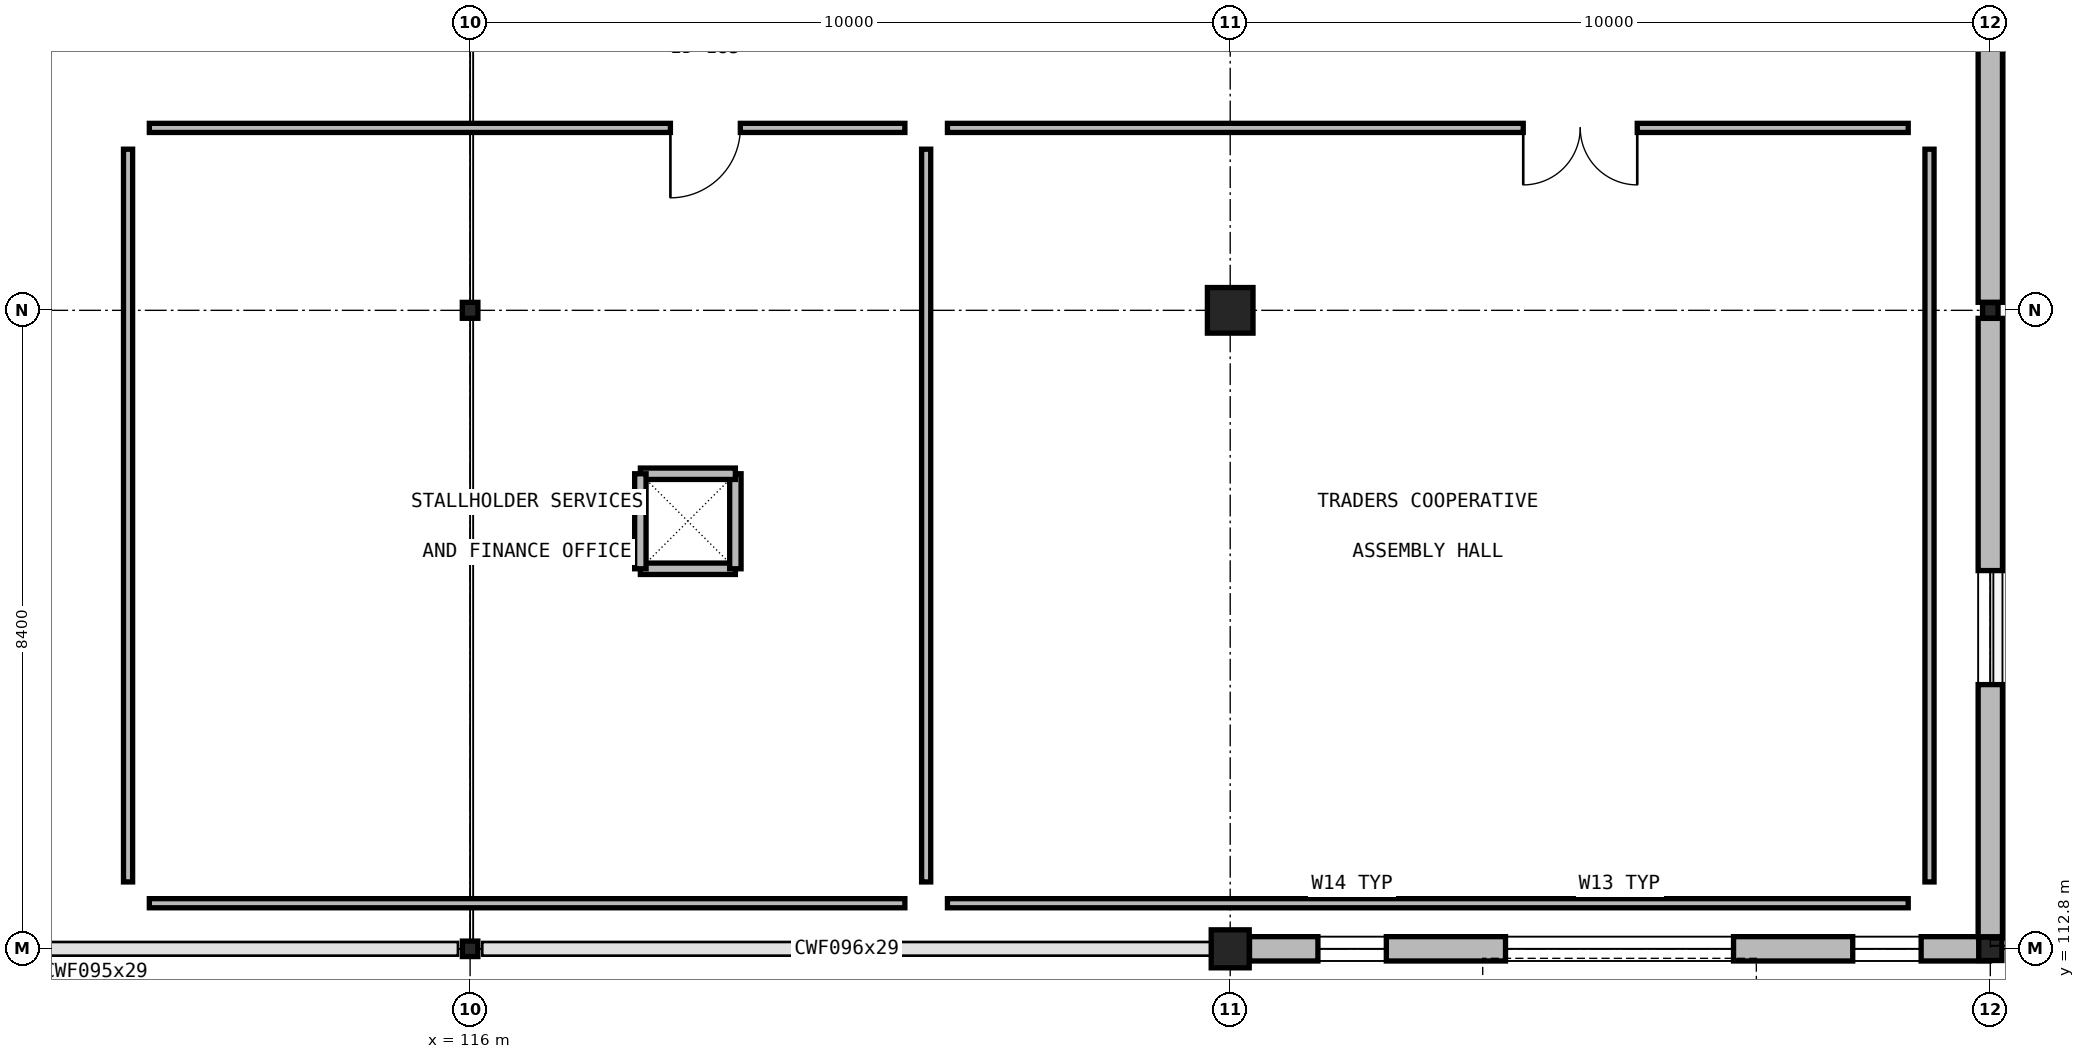
"""IFC4 building model, lengths in metres.
Left out: names, types, materials, properties, quantities, classifications, styles, units other than length and angle.
Written with IfcOpenShell. Run it as: python <this file> out.ifc"""

import sys

from ifc_helpers import new_model, si_unit, direction, frame, frame_2d, origin, origin_2d_with_axis, place, context, subcontext, project, spatial, rectangle, i_section, extrude, element, fill, save


model = new_model("IFC4")
c1 = context("Model", 3, precision=1e-05, world=origin(), true_north=direction((0.0, 1.0)))
c2 = subcontext(c1, "Body", "Model", "MODEL_VIEW")
j1 = project(units=[si_unit("LENGTHUNIT", "METRE"), si_unit("PLANEANGLEUNIT", "RADIAN")], contexts=[c1])
p1 = place(None, origin())
s1 = spatial("IfcSite", under=j1, at=p1, CompositionType="ELEMENT")
p2 = place(p1, origin())
s2 = spatial("IfcBuilding", under=s1, at=p2, CompositionType="ELEMENT")
p3 = place(p2, frame((0.0, 0.0, 15.3)))
s3 = spatial("IfcBuildingStorey", under=s2, at=p3, CompositionType="ELEMENT", Elevation=15.3)
p4 = place(p3, frame((116.0, 112.8, 0.0), z_axis=(0.0, 0.0, 1.0), x_axis=(1.0, 0.0, 0.0)))
e1 = element("IfcColumn", 1, at=p4, inside=s3, PredefinedType="COLUMN", context=c2, shape_type="SweptSolid", body=[
    extrude(i_section(OverallWidth=0.203, OverallDepth=0.203, WebThickness=0.007, FlangeThickness=0.011, FilletRadius=0.011, at=origin_2d_with_axis()), origin(), (0.0, 0.0, 1.0), 3.3),
])
p5 = place(p3, frame((116.0, 121.2, 0.0), z_axis=(0.0, 0.0, 1.0), x_axis=(1.0, 0.0, 0.0)))
e2 = element("IfcColumn", 2, at=p5, inside=s3, PredefinedType="COLUMN", context=c2, shape_type="SweptSolid", body=[
    extrude(i_section(OverallWidth=0.205, OverallDepth=0.21, WebThickness=0.009, FlangeThickness=0.014, FilletRadius=0.011, at=origin_2d_with_axis()), origin(), (0.0, 0.0, 1.0), 3.3),
])
p6 = place(p3, frame((126.0, 112.8, 0.0), z_axis=(0.0, 0.0, 1.0), x_axis=(1.0, 0.0, 0.0)))
e3 = element("IfcColumn", 3, at=p6, inside=s3, PredefinedType="COLUMN", context=c2, shape_type="SweptSolid", body=[
    extrude(rectangle(XDim=0.5, YDim=0.5, at=origin_2d_with_axis()), origin(), (0.0, 0.0, 1.0), 3.3),
])
p7 = place(p3, frame((126.0, 121.2, 0.0), z_axis=(0.0, 0.0, 1.0), x_axis=(1.0, 0.0, 0.0)))
e4 = element("IfcColumn", 4, at=p7, inside=s3, PredefinedType="COLUMN", context=c2, shape_type="SweptSolid", body=[
    extrude(rectangle(XDim=0.6, YDim=0.6, at=origin_2d_with_axis()), origin(), (0.0, 0.0, 1.0), 3.3),
])
p8 = place(p3, frame((136.0, 112.8, 0.0), z_axis=(0.0, 0.0, 1.0), x_axis=(1.0, 0.0, 0.0)))
e5 = element("IfcColumn", 5, at=p8, inside=s3, PredefinedType="COLUMN", context=c2, shape_type="SweptSolid", body=[
    extrude(i_section(OverallWidth=0.305, OverallDepth=0.308, WebThickness=0.01, FlangeThickness=0.015, FilletRadius=0.017, at=origin_2d_with_axis()), origin(), (0.0, 0.0, 1.0), 3.3),
])
p9 = place(p3, frame((136.0, 121.2, 0.0), z_axis=(0.0, 0.0, 1.0), x_axis=(1.0, 0.0, 0.0)))
e6 = element("IfcColumn", 6, at=p9, inside=s3, PredefinedType="COLUMN", context=c2, shape_type="SweptSolid", body=[
    extrude(i_section(OverallWidth=0.203, OverallDepth=0.203, WebThickness=0.007, FlangeThickness=0.011, FilletRadius=0.011, at=origin_2d_with_axis()), origin(), (0.0, 0.0, 1.0), 3.3),
])
p10 = place(p3, frame((126.254, 112.8, 0.0), z_axis=(0.0, 0.0, 1.0), x_axis=(1.0, 0.0, 0.0)))
e7 = element("IfcWall", 7, at=p10, inside=s3, PredefinedType="SOLIDWALL", context=c2, shape_type="SweptSolid", body=[
    extrude(rectangle(XDim=9.736, YDim=0.32, at=frame_2d((4.868, 0.0), x_axis=(1.0, 0.0))), origin(), (0.0, 0.0, 1.0), 2.94),
])
p11 = place(p10, frame((3.368, 0.0, 0.85)))
e8 = element("IfcOpeningElement", 8, at=p11, cuts=e7, PredefinedType="OPENING", context=c2, shape_type="SweptSolid", body=[
    extrude(rectangle(XDim=3.0, YDim=1.65, at=frame_2d((1.5, 0.825), x_axis=(1.0, 0.0))), frame((0.0, 0.17, 0.0), z_axis=(0.0, -1.0, 0.0), x_axis=(1.0, 0.0, 0.0)), (0.0, 0.0, 1.0), 0.34),
])
p12 = place(p10, frame((0.9, 0.0, 0.85)))
e9 = element("IfcOpeningElement", 9, at=p12, cuts=e7, PredefinedType="OPENING", context=c2, shape_type="SweptSolid", body=[
    extrude(rectangle(XDim=0.9, YDim=1.65, at=frame_2d((0.45, 0.825), x_axis=(1.0, 0.0))), frame((0.0, 0.17, 0.0), z_axis=(0.0, -1.0, 0.0), x_axis=(1.0, 0.0, 0.0)), (0.0, 0.0, 1.0), 0.34),
])
p13 = place(p10, frame((7.936, 0.0, 0.85)))
e10 = element("IfcOpeningElement", 10, at=p13, cuts=e7, PredefinedType="OPENING", context=c2, shape_type="SweptSolid", body=[
    extrude(rectangle(XDim=0.9, YDim=1.65, at=frame_2d((0.45, 0.825), x_axis=(1.0, 0.0))), frame((0.0, 0.17, 0.0), z_axis=(0.0, -1.0, 0.0), x_axis=(1.0, 0.0, 0.0)), (0.0, 0.0, 1.0), 0.34),
])
p14 = place(p3, frame((136.0, 112.958, 0.0), z_axis=(0.0, 0.0, 1.0), x_axis=(0.0, 1.0, 0.0)))
e11 = element("IfcWall", 11, at=p14, inside=s3, PredefinedType="SOLIDWALL", context=c2, shape_type="SweptSolid", body=[
    extrude(rectangle(XDim=8.136, YDim=0.32, at=frame_2d((4.068, 0.0), x_axis=(1.0, 0.0))), origin(), (0.0, 0.0, 1.0), 2.94),
])
p15 = place(p14, frame((3.318, 0.0, 0.85)))
e12 = element("IfcOpeningElement", 12, at=p15, cuts=e11, PredefinedType="OPENING", context=c2, shape_type="SweptSolid", body=[
    extrude(rectangle(XDim=1.5, YDim=1.6, at=frame_2d((0.75, 0.8), x_axis=(1.0, 0.0))), frame((0.0, 0.17, 0.0), z_axis=(0.0, -1.0, 0.0), x_axis=(1.0, 0.0, 0.0)), (0.0, 0.0, 1.0), 0.34),
])
p16 = place(p3, frame((136.0, 121.306, 0.0), z_axis=(0.0, 0.0, 1.0), x_axis=(0.0, 1.0, 0.0)))
e13 = element("IfcWall", 13, at=p16, inside=s3, PredefinedType="SOLIDWALL", context=c2, shape_type="SweptSolid", body=[
    extrude(rectangle(XDim=8.186, YDim=0.32, at=frame_2d((4.093, 0.0), x_axis=(1.0, 0.0))), origin(), (0.0, 0.0, 1.0), 2.94),
])
p17 = place(p16, frame((3.493, 0.0, 0.0)))
e14 = element("IfcOpeningElement", 14, at=p17, cuts=e13, PredefinedType="OPENING", context=c2, shape_type="SweptSolid", body=[
    extrude(rectangle(XDim=1.2, YDim=2.2, at=frame_2d((0.6, 1.1), x_axis=(1.0, 0.0))), frame((0.0, 0.17, 0.0), z_axis=(0.0, -1.0, 0.0), x_axis=(1.0, 0.0, 0.0)), (0.0, 0.0, 1.0), 0.34),
])
for number, where, z_axis, x_axis in (
    (15, (118.24, 117.8, 0.0), (0.0, 0.0, 1.0), (1.0, 0.0, 0.0)),
    (16, (119.49, 117.8, 0.0), (0.0, 0.0, 1.0), (0.0, 1.0, 0.0)),
    (17, (119.49, 119.05, 0.0), (0.0, 0.0, 1.0), (-1.0, 0.0, 0.0)),
    (18, (118.24, 119.05, 0.0), (0.0, 0.0, 1.0), (0.0, -1.0, 0.0)),
):
    element("IfcWall", number, at=place(p3, frame(where, z_axis=z_axis, x_axis=x_axis)), inside=s3, PredefinedType="PARTITIONING", context=c2, shape_type="SweptSolid", body=[
        extrude(rectangle(XDim=1.25, YDim=0.15, at=frame_2d((0.625, 0.0), x_axis=(1.0, 0.0))), origin(), (0.0, 0.0, 1.0), 2.61),
    ])
p18 = place(p3, frame((111.78, 113.4, 0.0), z_axis=(0.0, 0.0, 1.0), x_axis=(1.0, 0.0, 0.0)))
e19 = element("IfcWall", 19, at=p18, inside=s3, PredefinedType="PARTITIONING", context=c2, shape_type="SweptSolid", body=[
    extrude(rectangle(XDim=9.94, YDim=0.12, at=frame_2d((4.97, 0.0), x_axis=(1.0, 0.0))), origin(), (0.0, 0.0, 1.0), 2.47),
])
p19 = place(p3, frame((122.0, 113.68, 0.0), z_axis=(0.0, 0.0, 1.0), x_axis=(0.0, 1.0, 0.0)))
e20 = element("IfcWall", 20, at=p19, inside=s3, PredefinedType="PARTITIONING", context=c2, shape_type="SweptSolid", body=[
    extrude(rectangle(XDim=9.64, YDim=0.12, at=frame_2d((4.82, 0.0), x_axis=(1.0, 0.0))), origin(), (0.0, 0.0, 1.0), 2.47),
])
p20 = place(p3, frame((121.72, 123.6, 0.0), z_axis=(0.0, 0.0, 1.0), x_axis=(-1.0, 0.0, 0.0)))
e21 = element("IfcWall", 21, at=p20, inside=s3, PredefinedType="PARTITIONING", context=c2, shape_type="SweptSolid", body=[
    extrude(rectangle(XDim=9.94, YDim=0.12, at=frame_2d((4.97, 0.0), x_axis=(1.0, 0.0))), origin(), (0.0, 0.0, 1.0), 2.47),
])
p21 = place(p20, frame((2.165, 0.0, 0.0)))
e22 = element("IfcOpeningElement", 22, at=p21, cuts=e21, PredefinedType="OPENING", context=c2, shape_type="SweptSolid", body=[
    extrude(rectangle(XDim=0.92, YDim=2.15, at=frame_2d((0.46, 1.075), x_axis=(1.0, 0.0))), frame((0.0, 0.07, 0.0), z_axis=(0.0, -1.0, 0.0), x_axis=(1.0, 0.0, 0.0)), (0.0, 0.0, 1.0), 0.14),
])
p22 = place(p3, frame((111.5, 123.32, 0.0), z_axis=(0.0, 0.0, 1.0), x_axis=(0.0, -1.0, 0.0)))
e23 = element("IfcWall", 23, at=p22, inside=s3, PredefinedType="PARTITIONING", context=c2, shape_type="SweptSolid", body=[
    extrude(rectangle(XDim=9.64, YDim=0.12, at=frame_2d((4.82, 0.0), x_axis=(1.0, 0.0))), origin(), (0.0, 0.0, 1.0), 2.47),
])
p23 = place(p3, frame((122.28, 113.4, 0.0), z_axis=(0.0, 0.0, 1.0), x_axis=(1.0, 0.0, 0.0)))
e24 = element("IfcWall", 24, at=p23, inside=s3, PredefinedType="PARTITIONING", context=c2, shape_type="SweptSolid", body=[
    extrude(rectangle(XDim=12.64, YDim=0.12, at=frame_2d((6.32, 0.0), x_axis=(1.0, 0.0))), origin(), (0.0, 0.0, 1.0), 2.47),
])
p24 = place(p3, frame((135.2, 113.68, 0.0), z_axis=(0.0, 0.0, 1.0), x_axis=(0.0, 1.0, 0.0)))
e25 = element("IfcWall", 25, at=p24, inside=s3, PredefinedType="PARTITIONING", context=c2, shape_type="SweptSolid", body=[
    extrude(rectangle(XDim=9.64, YDim=0.12, at=frame_2d((4.82, 0.0), x_axis=(1.0, 0.0))), origin(), (0.0, 0.0, 1.0), 2.47),
])
p25 = place(p3, frame((134.92, 123.6, 0.0), z_axis=(0.0, 0.0, 1.0), x_axis=(-1.0, 0.0, 0.0)))
e26 = element("IfcWall", 26, at=p25, inside=s3, PredefinedType="PARTITIONING", context=c2, shape_type="SweptSolid", body=[
    extrude(rectangle(XDim=12.64, YDim=0.12, at=frame_2d((6.32, 0.0), x_axis=(1.0, 0.0))), origin(), (0.0, 0.0, 1.0), 2.47),
])
p26 = place(p25, frame((3.565, 0.0, 0.0)))
e27 = element("IfcOpeningElement", 27, at=p26, cuts=e26, PredefinedType="OPENING", context=c2, shape_type="SweptSolid", body=[
    extrude(rectangle(XDim=1.5, YDim=2.25, at=frame_2d((0.75, 1.125), x_axis=(1.0, 0.0))), frame((0.0, 0.07, 0.0), z_axis=(0.0, -1.0, 0.0), x_axis=(1.0, 0.0, 0.0)), (0.0, 0.0, 1.0), 0.14),
])
p27 = place(p11, origin())
e28 = element("IfcWindow", 28, at=p27, inside=s3, PartitioningType="SINGLE_PANEL", PredefinedType="WINDOW", context=c2, shape_type="SweptSolid", body=[
    extrude(rectangle(XDim=3.0, YDim=1.65, at=frame_2d((1.5, 0.825), x_axis=(1.0, 0.0))), frame((0.0, 0.03, 0.0), z_axis=(0.0, -1.0, 0.0), x_axis=(1.0, 0.0, 0.0)), (0.0, 0.0, 1.0), 0.06),
])
fill(e8, e28)
p28 = place(p12, origin())
e29 = element("IfcWindow", 29, at=p28, inside=s3, PartitioningType="SINGLE_PANEL", PredefinedType="WINDOW", context=c2, shape_type="SweptSolid", body=[
    extrude(rectangle(XDim=0.9, YDim=1.65, at=frame_2d((0.45, 0.825), x_axis=(1.0, 0.0))), frame((0.0, 0.03, 0.0), z_axis=(0.0, -1.0, 0.0), x_axis=(1.0, 0.0, 0.0)), (0.0, 0.0, 1.0), 0.06),
])
fill(e9, e29)
p29 = place(p13, origin())
e30 = element("IfcWindow", 30, at=p29, inside=s3, PartitioningType="SINGLE_PANEL", PredefinedType="WINDOW", context=c2, shape_type="SweptSolid", body=[
    extrude(rectangle(XDim=0.9, YDim=1.65, at=frame_2d((0.45, 0.825), x_axis=(1.0, 0.0))), frame((0.0, 0.03, 0.0), z_axis=(0.0, -1.0, 0.0), x_axis=(1.0, 0.0, 0.0)), (0.0, 0.0, 1.0), 0.06),
])
fill(e10, e30)
p30 = place(p15, origin())
e31 = element("IfcWindow", 31, at=p30, inside=s3, PartitioningType="SINGLE_PANEL", PredefinedType="WINDOW", context=c2, shape_type="SweptSolid", body=[
    extrude(rectangle(XDim=1.5, YDim=1.6, at=frame_2d((0.75, 0.8), x_axis=(1.0, 0.0))), frame((0.0, 0.03, 0.0), z_axis=(0.0, -1.0, 0.0), x_axis=(1.0, 0.0, 0.0)), (0.0, 0.0, 1.0), 0.06),
])
fill(e12, e31)
p31 = place(p21, origin())
e32 = element("IfcDoor", 32, at=p31, inside=s3, OperationType="SINGLE_SWING_RIGHT", PredefinedType="DOOR", context=c2, shape_type="SweptSolid", body=[
    extrude(rectangle(XDim=0.92, YDim=2.15, at=frame_2d((0.46, 1.075), x_axis=(1.0, 0.0))), frame((0.0, 0.025, 0.0), z_axis=(0.0, -1.0, 0.0), x_axis=(1.0, 0.0, 0.0)), (0.0, 0.0, 1.0), 0.05),
])
fill(e22, e32)
p32 = place(p26, origin())
e33 = element("IfcDoor", 33, at=p32, inside=s3, OperationType="DOUBLE_SWING_LEFT", PredefinedType="DOOR", context=c2, shape_type="SweptSolid", body=[
    extrude(rectangle(XDim=1.5, YDim=2.25, at=frame_2d((0.75, 1.125), x_axis=(1.0, 0.0))), frame((0.0, 0.025, 0.0), z_axis=(0.0, -1.0, 0.0), x_axis=(1.0, 0.0, 0.0)), (0.0, 0.0, 1.0), 0.05),
])
fill(e27, e33)
save(model, sys.argv[1])
